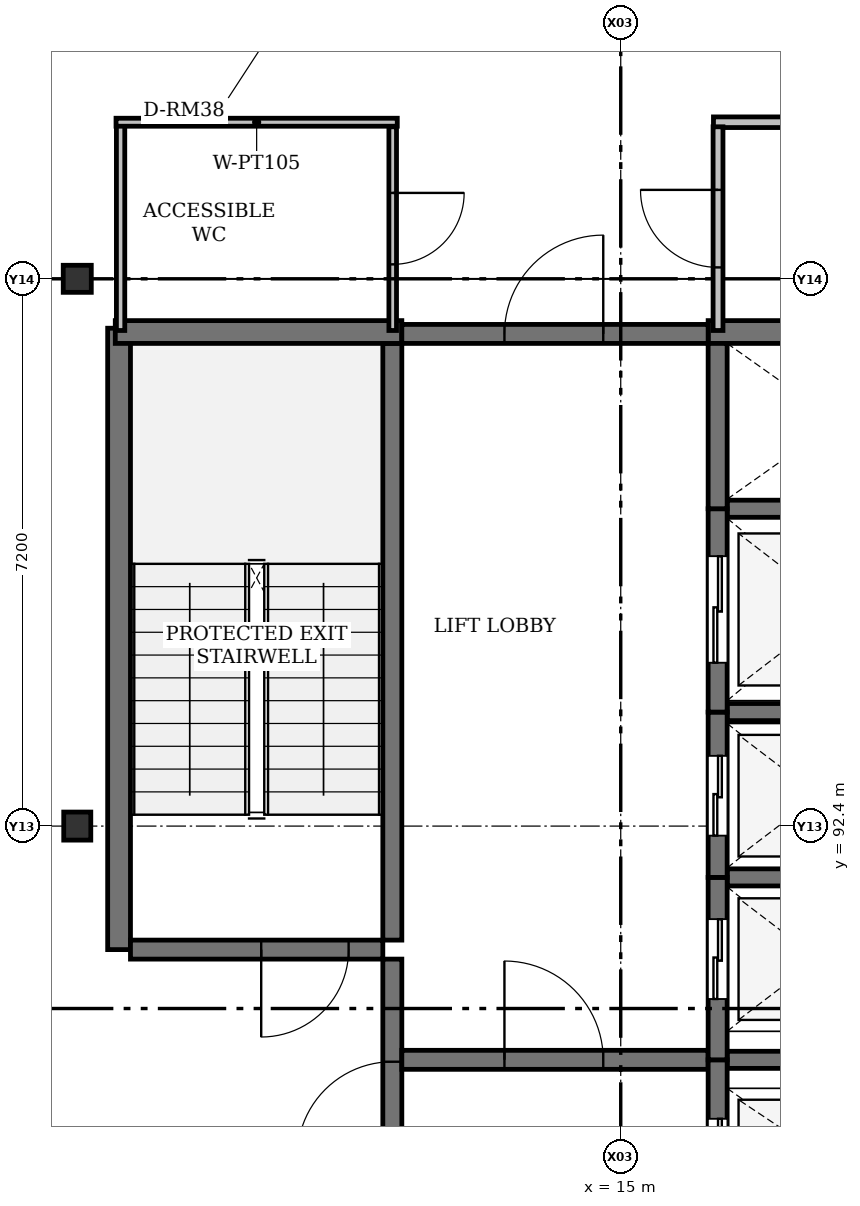
"""IFC4 building model, lengths in metres.
Left out: names, types, materials, properties, quantities, classifications, styles, units other than length and angle.
Written with IfcOpenShell. Run it as: python <this file> out.ifc"""

import sys

from ifc_helpers import new_model, si_unit, direction, frame, frame_2d, origin, origin_2d, place, context, subcontext, project, spatial, rectangle, i_section, extrude, element, fill, save


model = new_model("IFC4")
c1 = context("Model", 3, precision=1e-05, world=origin(), true_north=direction((0.0, 1.0)))
c2 = subcontext(c1, "Body", "Model", "MODEL_VIEW")
j1 = project(units=[si_unit("LENGTHUNIT", "METRE"), si_unit("PLANEANGLEUNIT", "RADIAN")], contexts=[c1])
p1 = place(None, origin())
s1 = spatial("IfcSite", under=j1, at=p1, CompositionType="ELEMENT")
p2 = place(p1, origin())
s2 = spatial("IfcBuilding", under=s1, at=p2, CompositionType="ELEMENT")
p3 = place(p2, frame((0.0, 0.0, 56.1)))
s3 = spatial("IfcBuildingStorey", under=s2, at=p3, CompositionType="ELEMENT", Elevation=56.1)
for number, where, z_axis, x_axis in (
    (1, (7.85, 92.4, 0.0), (0.0, 0.0, 1.0), (0.0, 1.0, 0.0)),
    (2, (7.85, 99.6, 0.0), (0.0, 0.0, 1.0), (1.0, 0.0, 0.0)),
):
    element("IfcColumn", number, at=place(p3, frame(where, z_axis=z_axis, x_axis=x_axis)), inside=s3, PredefinedType="COLUMN", context=c2, shape_type="SweptSolid", body=[
        extrude(i_section(OverallWidth=0.369, OverallDepth=0.356, WebThickness=0.011, FlangeThickness=0.018, FilletRadius=0.015, at=origin_2d()), origin(), (0.0, 0.0, 1.0), 4.2),
    ])
p4 = place(p3, frame((8.4, 90.775, 0.0), z_axis=(0.0, 0.0, 1.0), x_axis=(0.0, 1.0, 0.0)))
e3 = element("IfcWall", 3, at=p4, inside=s3, PredefinedType="SHEAR", context=c2, shape_type="SweptSolid", body=[
    extrude(rectangle(XDim=8.175, YDim=0.3, at=frame_2d((4.087, 0.0))), origin(), (0.0, 0.0, 1.0), 4.2),
])
p5 = place(p3, frame((11.995, 90.9, 0.0), z_axis=(0.0, 0.0, 1.0), x_axis=(0.0, 1.0, 0.0)))
e4 = element("IfcWall", 4, at=p5, inside=s3, PredefinedType="SHEAR", context=c2, shape_type="SweptSolid", body=[
    extrude(rectangle(XDim=7.85, YDim=0.25, at=frame_2d((3.925, 0.0))), origin(), (0.0, 0.0, 1.0), 4.2),
])
p6 = place(p3, frame((11.995, 86.75, 0.0), z_axis=(0.0, 0.0, 1.0), x_axis=(0.0, 1.0, 0.0)))
e5 = element("IfcWall", 5, at=p6, inside=s3, PredefinedType="SHEAR", context=c2, shape_type="SweptSolid", body=[
    extrude(rectangle(XDim=3.9, YDim=0.25, at=frame_2d((1.95, 0.0))), origin(), (0.0, 0.0, 1.0), 4.2),
])
p7 = place(p6, frame((1.3, 0.0, 0.0)))
e6 = element("IfcOpeningElement", 6, at=p7, cuts=e5, PredefinedType="OPENING", context=c2, shape_type="SweptSolid", body=[
    extrude(rectangle(XDim=1.25, YDim=2.2, at=frame_2d((0.625, 1.1))), frame((0.0, 0.125, 0.0), z_axis=(0.0, -1.0, 0.0), x_axis=(1.0, 0.0, 0.0)), (0.0, 0.0, 1.0), 0.25),
])
p8 = place(p3, frame((8.35, 98.9, 0.0), z_axis=(0.0, 0.0, 1.0), x_axis=(1.0, 0.0, 0.0)))
e7 = element("IfcWall", 7, at=p8, inside=s3, PredefinedType="SHEAR", context=c2, shape_type="SweptSolid", body=[
    extrude(rectangle(XDim=3.77, YDim=0.3, at=frame_2d((1.885, 0.0))), origin(), (0.0, 0.0, 1.0), 4.2),
])
p9 = place(p3, frame((16.15, 98.9, 0.0), z_axis=(0.0, 0.0, 1.0), x_axis=(1.0, 0.0, 0.0)))
e8 = element("IfcWall", 8, at=p9, inside=s3, PredefinedType="SHEAR", context=c2, shape_type="SweptSolid", body=[
    extrude(rectangle(XDim=3.3, YDim=0.3, at=frame_2d((1.65, 0.0))), origin(), (0.0, 0.0, 1.0), 4.2),
])
p10 = place(p3, frame((12.12, 98.875, 0.0), z_axis=(0.0, 0.0, 1.0), x_axis=(1.0, 0.0, 0.0)))
e9 = element("IfcWall", 9, at=p10, inside=s3, PredefinedType="SHEAR", context=c2, shape_type="SweptSolid", body=[
    extrude(rectangle(XDim=4.03, YDim=0.25, at=frame_2d((2.015, 0.0))), origin(), (0.0, 0.0, 1.0), 4.2),
])
p11 = place(p10, frame((1.35, 0.0, 0.0)))
e10 = element("IfcOpeningElement", 10, at=p11, cuts=e9, PredefinedType="OPENING", context=c2, shape_type="SweptSolid", body=[
    extrude(rectangle(XDim=1.3, YDim=2.2, at=frame_2d((0.65, 1.1))), frame((0.0, 0.125, 0.0), z_axis=(0.0, -1.0, 0.0), x_axis=(1.0, 0.0, 0.0)), (0.0, 0.0, 1.0), 0.25),
])
p12 = place(p3, frame((11.87, 90.775, 0.0), z_axis=(0.0, 0.0, 1.0), x_axis=(-1.0, 0.0, 0.0)))
e11 = element("IfcWall", 11, at=p12, inside=s3, PredefinedType="SHEAR", context=c2, shape_type="SweptSolid", body=[
    extrude(rectangle(XDim=3.32, YDim=0.25, at=frame_2d((1.66, 0.0))), origin(), (0.0, 0.0, 1.0), 4.2),
])
p13 = place(p12, frame((0.45, 0.0, 0.0)))
e12 = element("IfcOpeningElement", 12, at=p13, cuts=e11, PredefinedType="OPENING", context=c2, shape_type="SweptSolid", body=[
    extrude(rectangle(XDim=1.15, YDim=2.15, at=frame_2d((0.575, 1.075))), frame((0.0, 0.125, 0.0), z_axis=(0.0, -1.0, 0.0), x_axis=(1.0, 0.0, 0.0)), (0.0, 0.0, 1.0), 0.25),
])
p14 = place(p3, frame((12.12, 89.325, 0.0), z_axis=(0.0, 0.0, 1.0), x_axis=(1.0, 0.0, 0.0)))
e13 = element("IfcWall", 13, at=p14, inside=s3, PredefinedType="SHEAR", context=c2, shape_type="SweptSolid", body=[
    extrude(rectangle(XDim=4.03, YDim=0.25, at=frame_2d((2.015, 0.0))), origin(), (0.0, 0.0, 1.0), 4.2),
])
p15 = place(p14, frame((1.35, 0.0, 0.0)))
e14 = element("IfcOpeningElement", 14, at=p15, cuts=e13, PredefinedType="OPENING", context=c2, shape_type="SweptSolid", body=[
    extrude(rectangle(XDim=1.3, YDim=2.2, at=frame_2d((0.65, 1.1))), frame((0.0, 0.125, 0.0), z_axis=(0.0, -1.0, 0.0), x_axis=(1.0, 0.0, 0.0)), (0.0, 0.0, 1.0), 0.25),
])
for number, where, z_axis, x_axis in (
    (15, (16.4, 89.325, 0.0), (0.0, 0.0, 1.0), (1.0, 0.0, 0.0)),
    (16, (16.4, 91.725, 0.0), (0.0, 0.0, 1.0), (1.0, 0.0, 0.0)),
    (17, (16.4, 93.9, 0.0), (0.0, 0.0, 1.0), (1.0, 0.0, 0.0)),
    (18, (16.4, 96.575, 0.0), (0.0, 0.0, 1.0), (1.0, 0.0, 0.0)),
):
    element("IfcWall", number, at=place(p3, frame(where, z_axis=z_axis, x_axis=x_axis)), inside=s3, PredefinedType="SHEAR", context=c2, shape_type="SweptSolid", body=[
        extrude(rectangle(XDim=2.8, YDim=0.225, at=frame_2d((1.4, 0.0))), origin(), (0.0, 0.0, 1.0), 4.2),
    ])
p16 = place(p3, frame((16.275, 86.925, 0.0), z_axis=(0.0, 0.0, 1.0), x_axis=(0.0, 1.0, 0.0)))
e19 = element("IfcWall", 19, at=p16, inside=s3, PredefinedType="SHEAR", context=c2, shape_type="SweptSolid", body=[
    extrude(rectangle(XDim=2.4, YDim=0.25, at=frame_2d((1.2, 0.0))), origin(), (0.0, 0.0, 1.0), 4.2),
])
p17 = place(p16, frame((0.525, 0.0, 0.0)))
e20 = element("IfcOpeningElement", 20, at=p17, cuts=e19, PredefinedType="OPENING", context=c2, shape_type="SweptSolid", body=[
    extrude(rectangle(XDim=1.1, YDim=2.15, at=frame_2d((0.55, 1.075))), frame((0.0, 0.125, 0.0), z_axis=(0.0, -1.0, 0.0), x_axis=(1.0, 0.0, 0.0)), (0.0, 0.0, 1.0), 0.25),
])
p18 = place(p3, frame((16.275, 89.325, 0.0), z_axis=(0.0, 0.0, 1.0), x_axis=(0.0, 1.0, 0.0)))
e21 = element("IfcWall", 21, at=p18, inside=s3, PredefinedType="SHEAR", context=c2, shape_type="SweptSolid", body=[
    extrude(rectangle(XDim=2.4, YDim=0.25, at=frame_2d((1.2, 0.0))), origin(), (0.0, 0.0, 1.0), 4.2),
])
p19 = place(p18, frame((0.8, 0.0, 0.0)))
e22 = element("IfcOpeningElement", 22, at=p19, cuts=e21, PredefinedType="OPENING", context=c2, shape_type="SweptSolid", body=[
    extrude(rectangle(XDim=1.05, YDim=2.15, at=frame_2d((0.525, 1.075))), frame((0.0, 0.125, 0.0), z_axis=(0.0, -1.0, 0.0), x_axis=(1.0, 0.0, 0.0)), (0.0, 0.0, 1.0), 0.25),
])
p20 = place(p3, frame((16.275, 91.725, 0.0), z_axis=(0.0, 0.0, 1.0), x_axis=(0.0, 1.0, 0.0)))
e23 = element("IfcWall", 23, at=p20, inside=s3, PredefinedType="SHEAR", context=c2, shape_type="SweptSolid", body=[
    extrude(rectangle(XDim=2.175, YDim=0.25, at=frame_2d((1.087, 0.0))), origin(), (0.0, 0.0, 1.0), 4.2),
])
p21 = place(p20, frame((0.55, 0.0, 0.0)))
e24 = element("IfcOpeningElement", 24, at=p21, cuts=e23, PredefinedType="OPENING", context=c2, shape_type="SweptSolid", body=[
    extrude(rectangle(XDim=1.05, YDim=2.15, at=frame_2d((0.525, 1.075))), frame((0.0, 0.125, 0.0), z_axis=(0.0, -1.0, 0.0), x_axis=(1.0, 0.0, 0.0)), (0.0, 0.0, 1.0), 0.25),
])
p22 = place(p3, frame((16.275, 93.9, 0.0), z_axis=(0.0, 0.0, 1.0), x_axis=(0.0, 1.0, 0.0)))
e25 = element("IfcWall", 25, at=p22, inside=s3, PredefinedType="SHEAR", context=c2, shape_type="SweptSolid", body=[
    extrude(rectangle(XDim=2.675, YDim=0.25, at=frame_2d((1.337, 0.0))), origin(), (0.0, 0.0, 1.0), 4.2),
])
p23 = place(p22, frame((0.65, 0.0, 0.0)))
e26 = element("IfcOpeningElement", 26, at=p23, cuts=e25, PredefinedType="OPENING", context=c2, shape_type="SweptSolid", body=[
    extrude(rectangle(XDim=1.4, YDim=2.25, at=frame_2d((0.7, 1.125))), frame((0.0, 0.125, 0.0), z_axis=(0.0, -1.0, 0.0), x_axis=(1.0, 0.0, 0.0)), (0.0, 0.0, 1.0), 0.25),
])
p24 = place(p3, frame((16.275, 96.575, 0.0), z_axis=(0.0, 0.0, 1.0), x_axis=(0.0, 1.0, 0.0)))
e27 = element("IfcWall", 27, at=p24, inside=s3, PredefinedType="SHEAR", context=c2, shape_type="SweptSolid", body=[
    extrude(rectangle(XDim=2.175, YDim=0.25, at=frame_2d((1.087, 0.0))), origin(), (0.0, 0.0, 1.0), 4.2),
])
p25 = place(p3, frame((8.42, 98.92, 0.0), z_axis=(0.0, 0.0, 1.0), x_axis=(0.0, 1.0, 0.0)))
e28 = element("IfcWall", 28, at=p25, inside=s3, PredefinedType="PARTITIONING", context=c2, shape_type="SweptSolid", body=[
    extrude(rectangle(XDim=2.74, YDim=0.11, at=frame_2d((1.37, 0.0))), origin(), (0.0, 0.0, 1.0), 3.436),
])
p26 = place(p3, frame((8.36, 101.66, 0.0), z_axis=(0.0, 0.0, 1.0), x_axis=(1.0, 0.0, 0.0)))
e29 = element("IfcWall", 29, at=p26, inside=s3, PredefinedType="PARTITIONING", context=c2, shape_type="SweptSolid", body=[
    extrude(rectangle(XDim=3.7, YDim=0.105, at=frame_2d((1.85, 0.0))), origin(), (0.0, 0.0, 1.0), 3.95),
])
p27 = place(p3, frame((12.0, 101.6, 0.0), z_axis=(0.0, 0.0, 1.0), x_axis=(0.0, -1.0, 0.0)))
e30 = element("IfcWall", 30, at=p27, inside=s3, PredefinedType="PARTITIONING", context=c2, shape_type="SweptSolid", body=[
    extrude(rectangle(XDim=2.68, YDim=0.1, at=frame_2d((1.34, 0.0))), origin(), (0.0, 0.0, 1.0), 3.436),
])
p28 = place(p27, frame((0.87, 0.0, 0.0)))
e31 = element("IfcOpeningElement", 31, at=p28, cuts=e30, PredefinedType="OPENING", context=c2, shape_type="SweptSolid", body=[
    extrude(rectangle(XDim=0.94, YDim=2.08, at=frame_2d((0.47, 1.04))), frame((0.0, 0.05, 0.0), z_axis=(0.0, -1.0, 0.0), x_axis=(1.0, 0.0, 0.0)), (0.0, 0.0, 1.0), 0.1),
])
p29 = place(p3, frame((19.38, 101.66, 0.0), z_axis=(0.0, 0.0, 1.0), x_axis=(-1.0, 0.0, 0.0)))
e32 = element("IfcWall", 32, at=p29, inside=s3, PredefinedType="PARTITIONING", context=c2, shape_type="SweptSolid", body=[
    extrude(rectangle(XDim=3.16, YDim=0.14, at=frame_2d((1.58, 0.0))), origin(), (0.0, 0.0, 1.0), 3.95),
])
p30 = place(p3, frame((16.28, 98.92, 0.0), z_axis=(0.0, 0.0, 1.0), x_axis=(0.0, 1.0, 0.0)))
e33 = element("IfcWall", 33, at=p30, inside=s3, PredefinedType="PARTITIONING", context=c2, shape_type="SweptSolid", body=[
    extrude(rectangle(XDim=2.68, YDim=0.13, at=frame_2d((1.34, 0.0))), origin(), (0.0, 0.0, 1.0), 3.436),
])
p31 = place(p30, frame((0.83, 0.0, 0.0)))
e34 = element("IfcOpeningElement", 34, at=p31, cuts=e33, PredefinedType="OPENING", context=c2, shape_type="SweptSolid", body=[
    extrude(rectangle(XDim=1.02, YDim=2.08, at=frame_2d((0.51, 1.04))), frame((0.0, 0.065, 0.0), z_axis=(0.0, -1.0, 0.0), x_axis=(1.0, 0.0, 0.0)), (0.0, 0.0, 1.0), 0.13),
])
p32 = place(p7, origin())
e35 = element("IfcDoor", 35, at=p32, inside=s3, OperationType="SINGLE_SWING_LEFT", PredefinedType="DOOR", context=c2, shape_type="SweptSolid", body=[
    extrude(rectangle(XDim=1.25, YDim=2.2, at=frame_2d((0.625, 1.1))), frame((0.0, 0.025, 0.0), z_axis=(0.0, -1.0, 0.0), x_axis=(1.0, 0.0, 0.0)), (0.0, 0.0, 1.0), 0.05),
])
fill(e6, e35)
p33 = place(p11, origin())
e36 = element("IfcDoor", 36, at=p33, inside=s3, OperationType="SINGLE_SWING_RIGHT", PredefinedType="DOOR", context=c2, shape_type="SweptSolid", body=[
    extrude(rectangle(XDim=1.3, YDim=2.2, at=frame_2d((0.65, 1.1))), frame((0.0, 0.025, 0.0), z_axis=(0.0, -1.0, 0.0), x_axis=(1.0, 0.0, 0.0)), (0.0, 0.0, 1.0), 0.05),
])
fill(e10, e36)
p34 = place(p13, origin())
e37 = element("IfcDoor", 37, at=p34, inside=s3, OperationType="SINGLE_SWING_RIGHT", PredefinedType="DOOR", context=c2, shape_type="SweptSolid", body=[
    extrude(rectangle(XDim=1.15, YDim=2.15, at=frame_2d((0.575, 1.075))), frame((0.0, 0.025, 0.0), z_axis=(0.0, -1.0, 0.0), x_axis=(1.0, 0.0, 0.0)), (0.0, 0.0, 1.0), 0.05),
])
fill(e12, e37)
p35 = place(p15, origin())
e38 = element("IfcDoor", 38, at=p35, inside=s3, OperationType="SINGLE_SWING_LEFT", PredefinedType="DOOR", context=c2, shape_type="SweptSolid", body=[
    extrude(rectangle(XDim=1.3, YDim=2.2, at=frame_2d((0.65, 1.1))), frame((0.0, 0.025, 0.0), z_axis=(0.0, -1.0, 0.0), x_axis=(1.0, 0.0, 0.0)), (0.0, 0.0, 1.0), 0.05),
])
fill(e14, e38)
p36 = place(p17, origin())
e39 = element("IfcDoor", 39, at=p36, inside=s3, OperationType="SLIDING_TO_LEFT", PredefinedType="DOOR", context=c2, shape_type="SweptSolid", body=[
    extrude(rectangle(XDim=1.1, YDim=2.15, at=frame_2d((0.55, 1.075))), frame((0.0, 0.025, 0.0), z_axis=(0.0, -1.0, 0.0), x_axis=(1.0, 0.0, 0.0)), (0.0, 0.0, 1.0), 0.05),
])
fill(e20, e39)
p37 = place(p19, origin())
e40 = element("IfcDoor", 40, at=p37, inside=s3, OperationType="SLIDING_TO_LEFT", PredefinedType="DOOR", context=c2, shape_type="SweptSolid", body=[
    extrude(rectangle(XDim=1.05, YDim=2.15, at=frame_2d((0.525, 1.075))), frame((0.0, 0.025, 0.0), z_axis=(0.0, -1.0, 0.0), x_axis=(1.0, 0.0, 0.0)), (0.0, 0.0, 1.0), 0.05),
])
fill(e22, e40)
p38 = place(p21, origin())
e41 = element("IfcDoor", 41, at=p38, inside=s3, OperationType="SLIDING_TO_LEFT", PredefinedType="DOOR", context=c2, shape_type="SweptSolid", body=[
    extrude(rectangle(XDim=1.05, YDim=2.15, at=frame_2d((0.525, 1.075))), frame((0.0, 0.025, 0.0), z_axis=(0.0, -1.0, 0.0), x_axis=(1.0, 0.0, 0.0)), (0.0, 0.0, 1.0), 0.05),
])
fill(e24, e41)
p39 = place(p23, origin())
e42 = element("IfcDoor", 42, at=p39, inside=s3, OperationType="SLIDING_TO_LEFT", PredefinedType="DOOR", context=c2, shape_type="SweptSolid", body=[
    extrude(rectangle(XDim=1.4, YDim=2.25, at=frame_2d((0.7, 1.125))), frame((0.0, 0.025, 0.0), z_axis=(0.0, -1.0, 0.0), x_axis=(1.0, 0.0, 0.0)), (0.0, 0.0, 1.0), 0.05),
])
fill(e26, e42)
p40 = place(p28, origin())
e43 = element("IfcDoor", 43, at=p40, inside=s3, OperationType="SINGLE_SWING_LEFT", PredefinedType="DOOR", context=c2, shape_type="SweptSolid", body=[
    extrude(rectangle(XDim=0.94, YDim=2.08, at=frame_2d((0.47, 1.04))), frame((0.0, 0.025, 0.0), z_axis=(0.0, -1.0, 0.0), x_axis=(1.0, 0.0, 0.0)), (0.0, 0.0, 1.0), 0.05),
])
fill(e31, e43)
p41 = place(p31, origin())
e44 = element("IfcDoor", 44, at=p41, inside=s3, OperationType="SINGLE_SWING_RIGHT", PredefinedType="DOOR", context=c2, shape_type="SweptSolid", body=[
    extrude(rectangle(XDim=1.02, YDim=2.08, at=frame_2d((0.51, 1.04))), frame((0.0, 0.025, 0.0), z_axis=(0.0, -1.0, 0.0), x_axis=(1.0, 0.0, 0.0)), (0.0, 0.0, 1.0), 0.05),
])
fill(e34, e44)
save(model, sys.argv[1])
